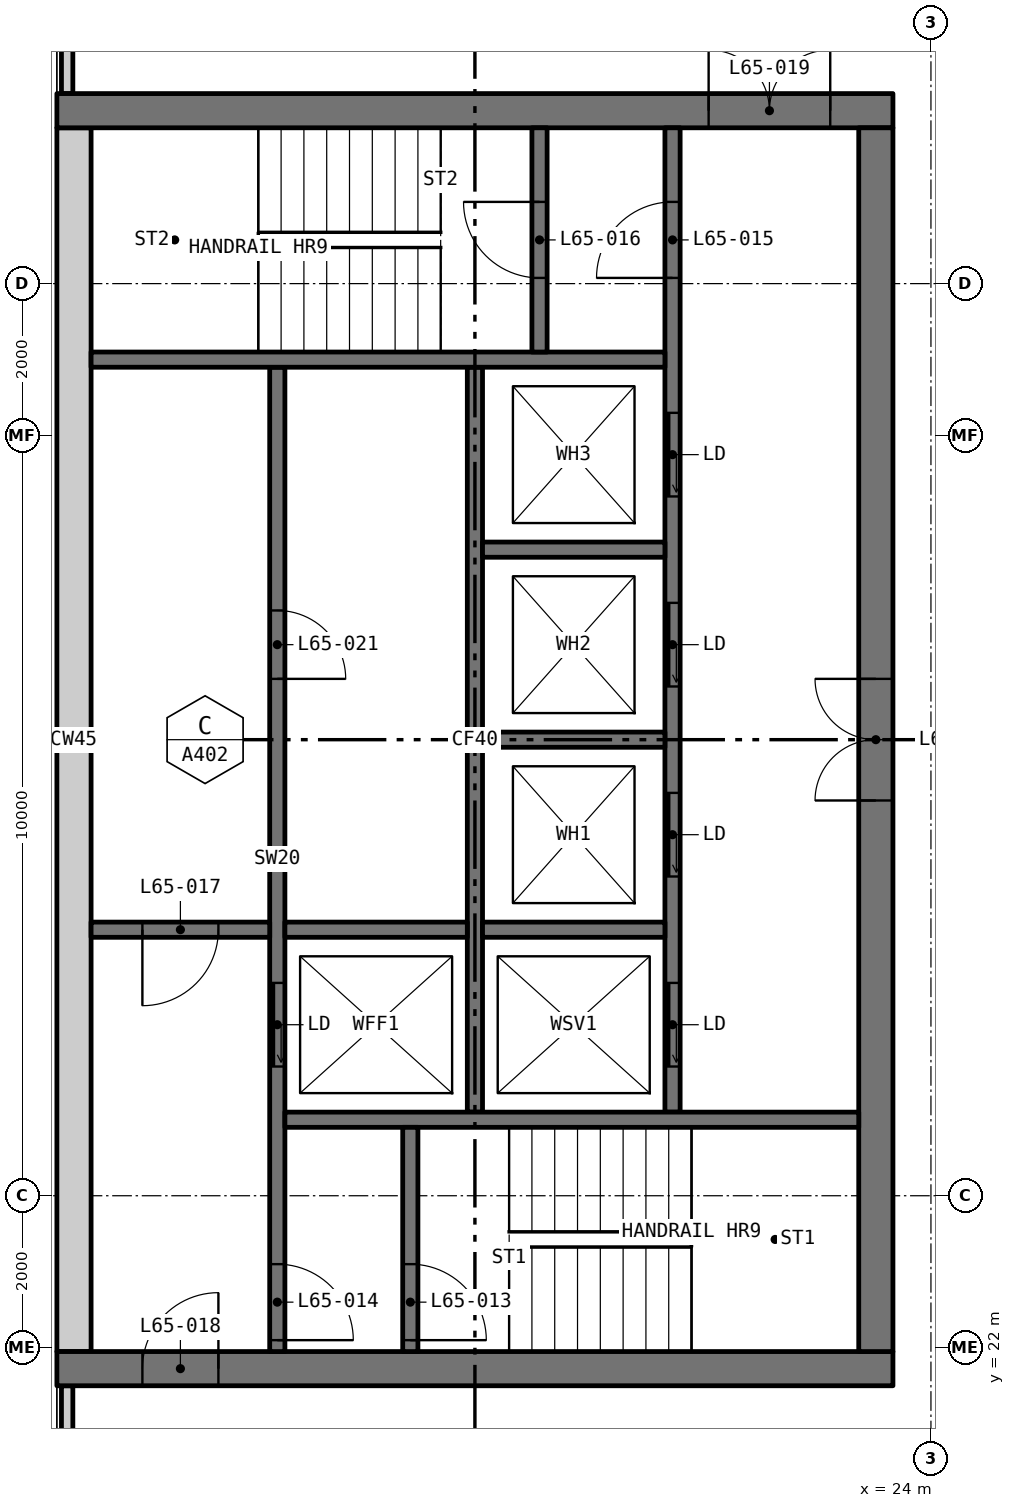
"""IFC4 building model, lengths in metres.
Left out: names, types, materials, properties, quantities, classifications, styles, units other than length and angle.
Written with IfcOpenShell. Run it as: python <this file> out.ifc"""

import sys

from ifc_helpers import new_model, si_unit, direction, frame, frame_2d, origin, place, context, subcontext, project, spatial, rectangle, extrude, element, fill, save


model = new_model("IFC4")
c1 = context("Model", 3, precision=1e-05, world=origin(), true_north=direction((0.0, 1.0)))
c2 = subcontext(c1, "Body", "Model", "MODEL_VIEW")
j1 = project(units=[si_unit("LENGTHUNIT", "METRE"), si_unit("PLANEANGLEUNIT", "RADIAN")], contexts=[c1])
p1 = place(None, origin())
s1 = spatial("IfcSite", under=j1, at=p1, CompositionType="ELEMENT")
p2 = place(p1, origin())
s2 = spatial("IfcBuilding", under=s1, at=p2, CompositionType="ELEMENT")
p3 = place(p2, frame((0.0, 0.0, 242.1)))
s3 = spatial("IfcBuildingStorey", under=s2, at=p3, CompositionType="ELEMENT", Elevation=242.1)
for number, where, z_axis, x_axis in (
    (1, (12.635, 18.71, 0.0), (0.0, 0.0, 1.0), (0.0, 1.0, 0.0)),
    (2, (12.635, 38.5, 0.0), (0.0, 0.0, 1.0), (0.0, 1.0, 0.0)),
):
    element("IfcWall", number, at=place(p3, frame(where, z_axis=z_axis, x_axis=x_axis)), inside=s3, PredefinedType="ELEMENTEDWALL", context=c2, shape_type="SweptSolid", body=[
        extrude(rectangle(XDim=2.79, YDim=0.15, at=frame_2d((1.395, 0.0))), origin(), (0.0, 0.0, 1.0), 3.05),
    ])
p4 = place(p3, frame((12.5, 21.725, 0.0), z_axis=(0.0, 0.0, 1.0), x_axis=(1.0, 0.0, 0.0)))
e3 = element("IfcWall", 3, at=p4, inside=s3, PredefinedType="SHEAR", context=c2, shape_type="SweptSolid", body=[
    extrude(rectangle(XDim=11.0, YDim=0.45, at=frame_2d((5.5, 0.0))), origin(), (0.0, 0.0, 1.0), 3.05),
])
p5 = place(p4, frame((1.125, 0.0, 0.0)))
e4 = element("IfcOpeningElement", 4, at=p5, cuts=e3, PredefinedType="OPENING", context=c2, shape_type="SweptSolid", body=[
    extrude(rectangle(XDim=1.0, YDim=2.1, at=frame_2d((0.5, 1.05))), frame((0.0, 0.235, 0.0), z_axis=(0.0, -1.0, 0.0), x_axis=(1.0, 0.0, 0.0)), (0.0, 0.0, 1.0), 0.47),
])
p6 = place(p3, frame((12.5, 38.275, 0.0), z_axis=(0.0, 0.0, 1.0), x_axis=(1.0, 0.0, 0.0)))
e5 = element("IfcWall", 5, at=p6, inside=s3, PredefinedType="SHEAR", context=c2, shape_type="SweptSolid", body=[
    extrude(rectangle(XDim=11.0, YDim=0.45, at=frame_2d((5.5, 0.0))), origin(), (0.0, 0.0, 1.0), 3.05),
])
p7 = place(p6, frame((8.575, 0.0, 0.0)))
e6 = element("IfcOpeningElement", 6, at=p7, cuts=e5, PredefinedType="OPENING", context=c2, shape_type="SweptSolid", body=[
    extrude(rectangle(XDim=1.6, YDim=2.1, at=frame_2d((0.8, 1.05))), frame((0.0, 0.235, 0.0), z_axis=(0.0, -1.0, 0.0), x_axis=(1.0, 0.0, 0.0)), (0.0, 0.0, 1.0), 0.47),
])
p8 = place(p3, frame((12.725, 21.95, 0.0), z_axis=(0.0, 0.0, 1.0), x_axis=(0.0, 1.0, 0.0)))
e7 = element("IfcWall", 7, at=p8, inside=s3, PredefinedType="SHEAR", context=c2, shape_type="SweptSolid", body=[
    extrude(rectangle(XDim=16.1, YDim=0.45, at=frame_2d((8.05, 0.0))), origin(), (0.0, 0.0, 1.0), 3.05),
])
p9 = place(p3, frame((23.275, 21.95, 0.0), z_axis=(0.0, 0.0, 1.0), x_axis=(0.0, 1.0, 0.0)))
e8 = element("IfcWall", 8, at=p9, inside=s3, PredefinedType="SHEAR", context=c2, shape_type="SweptSolid", body=[
    extrude(rectangle(XDim=16.1, YDim=0.45, at=frame_2d((8.05, 0.0))), origin(), (0.0, 0.0, 1.0), 3.05),
])
p10 = place(p9, frame((7.25, 0.0, 0.0)))
e9 = element("IfcOpeningElement", 9, at=p10, cuts=e8, PredefinedType="OPENING", context=c2, shape_type="SweptSolid", body=[
    extrude(rectangle(XDim=1.6, YDim=2.1, at=frame_2d((0.8, 1.05))), frame((0.0, 0.235, 0.0), z_axis=(0.0, -1.0, 0.0), x_axis=(1.0, 0.0, 0.0)), (0.0, 0.0, 1.0), 0.47),
])
p11 = place(p3, frame((15.4, 21.95, 0.0), z_axis=(0.0, 0.0, 1.0), x_axis=(0.0, 1.0, 0.0)))
e10 = element("IfcWall", 10, at=p11, inside=s3, PredefinedType="SOLIDWALL", context=c2, shape_type="SweptSolid", body=[
    extrude(rectangle(XDim=12.95, YDim=0.2, at=frame_2d((6.475, 0.0))), origin(), (0.0, 0.0, 1.0), 3.05),
])
p12 = place(p11, frame((3.75, 0.0, 0.0)))
e11 = element("IfcOpeningElement", 11, at=p12, cuts=e10, PredefinedType="OPENING", context=c2, shape_type="SweptSolid", body=[
    extrude(rectangle(XDim=1.1, YDim=2.1, at=frame_2d((0.55, 1.05))), frame((0.0, 0.11, 0.0), z_axis=(0.0, -1.0, 0.0), x_axis=(1.0, 0.0, 0.0)), (0.0, 0.0, 1.0), 0.22),
])
p13 = place(p11, frame((0.15, 0.0, 0.0)))
e12 = element("IfcOpeningElement", 12, at=p13, cuts=e10, PredefinedType="OPENING", context=c2, shape_type="SweptSolid", body=[
    extrude(rectangle(XDim=1.0, YDim=2.1, at=frame_2d((0.5, 1.05))), frame((0.0, 0.11, 0.0), z_axis=(0.0, -1.0, 0.0), x_axis=(1.0, 0.0, 0.0)), (0.0, 0.0, 1.0), 0.22),
])
p14 = place(p11, frame((8.85, 0.0, 0.0)))
e13 = element("IfcOpeningElement", 13, at=p14, cuts=e10, PredefinedType="OPENING", context=c2, shape_type="SweptSolid", body=[
    extrude(rectangle(XDim=0.9, YDim=2.1, at=frame_2d((0.45, 1.05))), frame((0.0, 0.11, 0.0), z_axis=(0.0, -1.0, 0.0), x_axis=(1.0, 0.0, 0.0)), (0.0, 0.0, 1.0), 0.22),
])
p15 = place(p3, frame((20.6, 25.1, 0.0), z_axis=(0.0, 0.0, 1.0), x_axis=(0.0, 1.0, 0.0)))
e14 = element("IfcWall", 14, at=p15, inside=s3, PredefinedType="SOLIDWALL", context=c2, shape_type="SweptSolid", body=[
    extrude(rectangle(XDim=12.95, YDim=0.2, at=frame_2d((6.475, 0.0))), origin(), (0.0, 0.0, 1.0), 3.05),
])
p16 = place(p15, frame((0.6, 0.0, 0.0)))
e15 = element("IfcOpeningElement", 15, at=p16, cuts=e14, PredefinedType="OPENING", context=c2, shape_type="SweptSolid", body=[
    extrude(rectangle(XDim=1.1, YDim=2.1, at=frame_2d((0.55, 1.05))), frame((0.0, 0.11, 0.0), z_axis=(0.0, -1.0, 0.0), x_axis=(1.0, 0.0, 0.0)), (0.0, 0.0, 1.0), 0.22),
])
p17 = place(p15, frame((3.1, 0.0, 0.0)))
e16 = element("IfcOpeningElement", 16, at=p17, cuts=e14, PredefinedType="OPENING", context=c2, shape_type="SweptSolid", body=[
    extrude(rectangle(XDim=1.1, YDim=2.1, at=frame_2d((0.55, 1.05))), frame((0.0, 0.11, 0.0), z_axis=(0.0, -1.0, 0.0), x_axis=(1.0, 0.0, 0.0)), (0.0, 0.0, 1.0), 0.22),
])
p18 = place(p15, frame((5.6, 0.0, 0.0)))
e17 = element("IfcOpeningElement", 17, at=p18, cuts=e14, PredefinedType="OPENING", context=c2, shape_type="SweptSolid", body=[
    extrude(rectangle(XDim=1.1, YDim=2.1, at=frame_2d((0.55, 1.05))), frame((0.0, 0.11, 0.0), z_axis=(0.0, -1.0, 0.0), x_axis=(1.0, 0.0, 0.0)), (0.0, 0.0, 1.0), 0.22),
])
p19 = place(p15, frame((8.1, 0.0, 0.0)))
e18 = element("IfcOpeningElement", 18, at=p19, cuts=e14, PredefinedType="OPENING", context=c2, shape_type="SweptSolid", body=[
    extrude(rectangle(XDim=1.1, YDim=2.1, at=frame_2d((0.55, 1.05))), frame((0.0, 0.11, 0.0), z_axis=(0.0, -1.0, 0.0), x_axis=(1.0, 0.0, 0.0)), (0.0, 0.0, 1.0), 0.22),
])
p20 = place(p15, frame((10.975, 0.0, 0.0)))
e19 = element("IfcOpeningElement", 19, at=p20, cuts=e14, PredefinedType="OPENING", context=c2, shape_type="SweptSolid", body=[
    extrude(rectangle(XDim=1.0, YDim=2.1, at=frame_2d((0.5, 1.05))), frame((0.0, 0.11, 0.0), z_axis=(0.0, -1.0, 0.0), x_axis=(1.0, 0.0, 0.0)), (0.0, 0.0, 1.0), 0.22),
])
p21 = place(p3, frame((18.0, 25.1, 0.0), z_axis=(0.0, 0.0, 1.0), x_axis=(0.0, 1.0, 0.0)))
e20 = element("IfcWall", 20, at=p21, inside=s3, PredefinedType="SOLIDWALL", context=c2, shape_type="SweptSolid", body=[
    extrude(rectangle(XDim=9.8, YDim=0.2, at=frame_2d((4.9, 0.0))), origin(), (0.0, 0.0, 1.0), 3.05),
])
for number, where, z_axis, x_axis in (
    (21, (15.5, 25.0, 0.0), (0.0, 0.0, 1.0), (1.0, 0.0, 0.0)),
    (22, (12.95, 35.0, 0.0), (0.0, 0.0, 1.0), (1.0, 0.0, 0.0)),
):
    element("IfcWall", number, at=place(p3, frame(where, z_axis=z_axis, x_axis=x_axis)), inside=s3, PredefinedType="SOLIDWALL", context=c2, shape_type="SweptSolid", body=[
        extrude(rectangle(XDim=7.55, YDim=0.2, at=frame_2d((3.775, 0.0))), origin(), (0.0, 0.0, 1.0), 3.05),
    ])
p22 = place(p3, frame((12.95, 27.5, 0.0), z_axis=(0.0, 0.0, 1.0), x_axis=(1.0, 0.0, 0.0)))
e23 = element("IfcWall", 23, at=p22, inside=s3, PredefinedType="SOLIDWALL", context=c2, shape_type="SweptSolid", body=[
    extrude(rectangle(XDim=2.35, YDim=0.2, at=frame_2d((1.175, 0.0))), origin(), (0.0, 0.0, 1.0), 3.05),
])
p23 = place(p22, frame((0.675, 0.0, 0.0)))
e24 = element("IfcOpeningElement", 24, at=p23, cuts=e23, PredefinedType="OPENING", context=c2, shape_type="SweptSolid", body=[
    extrude(rectangle(XDim=1.0, YDim=2.1, at=frame_2d((0.5, 1.05))), frame((0.0, 0.11, 0.0), z_axis=(0.0, -1.0, 0.0), x_axis=(1.0, 0.0, 0.0)), (0.0, 0.0, 1.0), 0.22),
])
p24 = place(p3, frame((17.15, 21.95, 0.0), z_axis=(0.0, 0.0, 1.0), x_axis=(0.0, 1.0, 0.0)))
e25 = element("IfcWall", 25, at=p24, inside=s3, PredefinedType="SOLIDWALL", context=c2, shape_type="SweptSolid", body=[
    extrude(rectangle(XDim=2.95, YDim=0.2, at=frame_2d((1.475, 0.0))), origin(), (0.0, 0.0, 1.0), 3.05),
])
p25 = place(p24, frame((0.15, 0.0, 0.0)))
e26 = element("IfcOpeningElement", 26, at=p25, cuts=e25, PredefinedType="OPENING", context=c2, shape_type="SweptSolid", body=[
    extrude(rectangle(XDim=1.0, YDim=2.1, at=frame_2d((0.5, 1.05))), frame((0.0, 0.11, 0.0), z_axis=(0.0, -1.0, 0.0), x_axis=(1.0, 0.0, 0.0)), (0.0, 0.0, 1.0), 0.22),
])
p26 = place(p3, frame((18.85, 35.1, 0.0), z_axis=(0.0, 0.0, 1.0), x_axis=(0.0, 1.0, 0.0)))
e27 = element("IfcWall", 27, at=p26, inside=s3, PredefinedType="SOLIDWALL", context=c2, shape_type="SweptSolid", body=[
    extrude(rectangle(XDim=2.95, YDim=0.2, at=frame_2d((1.475, 0.0))), origin(), (0.0, 0.0, 1.0), 3.05),
])
p27 = place(p26, frame((0.975, 0.0, 0.0)))
e28 = element("IfcOpeningElement", 28, at=p27, cuts=e27, PredefinedType="OPENING", context=c2, shape_type="SweptSolid", body=[
    extrude(rectangle(XDim=1.0, YDim=2.1, at=frame_2d((0.5, 1.05))), frame((0.0, 0.11, 0.0), z_axis=(0.0, -1.0, 0.0), x_axis=(1.0, 0.0, 0.0)), (0.0, 0.0, 1.0), 0.22),
])
for number, where, z_axis, x_axis in (
    (29, (15.5, 27.5, 0.0), (0.0, 0.0, 1.0), (1.0, 0.0, 0.0)),
    (30, (18.1, 27.5, 0.0), (0.0, 0.0, 1.0), (1.0, 0.0, 0.0)),
    (31, (18.1, 30.0, 0.0), (0.0, 0.0, 1.0), (1.0, 0.0, 0.0)),
    (32, (18.1, 32.5, 0.0), (0.0, 0.0, 1.0), (1.0, 0.0, 0.0)),
):
    element("IfcWall", number, at=place(p3, frame(where, z_axis=z_axis, x_axis=x_axis)), inside=s3, PredefinedType="SOLIDWALL", context=c2, shape_type="SweptSolid", body=[
        extrude(rectangle(XDim=2.4, YDim=0.2, at=frame_2d((1.2, 0.0))), origin(), (0.0, 0.0, 1.0), 3.05),
    ])
p28 = place(p16, origin())
e33 = element("IfcDoor", 33, at=p28, inside=s3, OperationType="SLIDING_TO_LEFT", PredefinedType="DOOR", context=c2, shape_type="SweptSolid", body=[
    extrude(rectangle(XDim=1.1, YDim=2.1, at=frame_2d((0.55, 1.05))), frame((0.0, 0.025, 0.0), z_axis=(0.0, -1.0, 0.0), x_axis=(1.0, 0.0, 0.0)), (0.0, 0.0, 1.0), 0.05),
])
fill(e15, e33)
p29 = place(p17, origin())
e34 = element("IfcDoor", 34, at=p29, inside=s3, OperationType="SLIDING_TO_LEFT", PredefinedType="DOOR", context=c2, shape_type="SweptSolid", body=[
    extrude(rectangle(XDim=1.1, YDim=2.1, at=frame_2d((0.55, 1.05))), frame((0.0, 0.025, 0.0), z_axis=(0.0, -1.0, 0.0), x_axis=(1.0, 0.0, 0.0)), (0.0, 0.0, 1.0), 0.05),
])
fill(e16, e34)
p30 = place(p18, origin())
e35 = element("IfcDoor", 35, at=p30, inside=s3, OperationType="SLIDING_TO_LEFT", PredefinedType="DOOR", context=c2, shape_type="SweptSolid", body=[
    extrude(rectangle(XDim=1.1, YDim=2.1, at=frame_2d((0.55, 1.05))), frame((0.0, 0.025, 0.0), z_axis=(0.0, -1.0, 0.0), x_axis=(1.0, 0.0, 0.0)), (0.0, 0.0, 1.0), 0.05),
])
fill(e17, e35)
p31 = place(p19, origin())
e36 = element("IfcDoor", 36, at=p31, inside=s3, OperationType="SLIDING_TO_LEFT", PredefinedType="DOOR", context=c2, shape_type="SweptSolid", body=[
    extrude(rectangle(XDim=1.1, YDim=2.1, at=frame_2d((0.55, 1.05))), frame((0.0, 0.025, 0.0), z_axis=(0.0, -1.0, 0.0), x_axis=(1.0, 0.0, 0.0)), (0.0, 0.0, 1.0), 0.05),
])
fill(e18, e36)
p32 = place(p12, origin())
e37 = element("IfcDoor", 37, at=p32, inside=s3, OperationType="SLIDING_TO_LEFT", PredefinedType="DOOR", context=c2, shape_type="SweptSolid", body=[
    extrude(rectangle(XDim=1.1, YDim=2.1, at=frame_2d((0.55, 1.05))), frame((0.0, 0.025, 0.0), z_axis=(0.0, -1.0, 0.0), x_axis=(1.0, 0.0, 0.0)), (0.0, 0.0, 1.0), 0.05),
])
fill(e11, e37)
p33 = place(p25, frame((1.0, 0.0, 0.0), x_axis=(-1.0, 0.0, 0.0)))
e38 = element("IfcDoor", 38, at=p33, inside=s3, OperationType="SINGLE_SWING_LEFT", PredefinedType="DOOR", context=c2, shape_type="SweptSolid", body=[
    extrude(rectangle(XDim=1.0, YDim=2.1, at=frame_2d((0.5, 1.05))), frame((0.0, 0.025, 0.0), z_axis=(0.0, -1.0, 0.0), x_axis=(1.0, 0.0, 0.0)), (0.0, 0.0, 1.0), 0.05),
])
fill(e26, e38)
p34 = place(p13, frame((1.0, 0.0, 0.0), x_axis=(-1.0, 0.0, 0.0)))
e39 = element("IfcDoor", 39, at=p34, inside=s3, OperationType="SINGLE_SWING_LEFT", PredefinedType="DOOR", context=c2, shape_type="SweptSolid", body=[
    extrude(rectangle(XDim=1.0, YDim=2.1, at=frame_2d((0.5, 1.05))), frame((0.0, 0.025, 0.0), z_axis=(0.0, -1.0, 0.0), x_axis=(1.0, 0.0, 0.0)), (0.0, 0.0, 1.0), 0.05),
])
fill(e12, e39)
p35 = place(p20, origin())
e40 = element("IfcDoor", 40, at=p35, inside=s3, OperationType="SINGLE_SWING_RIGHT", PredefinedType="DOOR", context=c2, shape_type="SweptSolid", body=[
    extrude(rectangle(XDim=1.0, YDim=2.1, at=frame_2d((0.5, 1.05))), frame((0.0, 0.025, 0.0), z_axis=(0.0, -1.0, 0.0), x_axis=(1.0, 0.0, 0.0)), (0.0, 0.0, 1.0), 0.05),
])
fill(e19, e40)
p36 = place(p27, origin())
e41 = element("IfcDoor", 41, at=p36, inside=s3, OperationType="SINGLE_SWING_LEFT", PredefinedType="DOOR", context=c2, shape_type="SweptSolid", body=[
    extrude(rectangle(XDim=1.0, YDim=2.1, at=frame_2d((0.5, 1.05))), frame((0.0, 0.025, 0.0), z_axis=(0.0, -1.0, 0.0), x_axis=(1.0, 0.0, 0.0)), (0.0, 0.0, 1.0), 0.05),
])
fill(e28, e41)
p37 = place(p23, frame((1.0, 0.0, 0.0), x_axis=(-1.0, 0.0, 0.0)))
e42 = element("IfcDoor", 42, at=p37, inside=s3, OperationType="SINGLE_SWING_LEFT", PredefinedType="DOOR", context=c2, shape_type="SweptSolid", body=[
    extrude(rectangle(XDim=1.0, YDim=2.1, at=frame_2d((0.5, 1.05))), frame((0.0, 0.025, 0.0), z_axis=(0.0, -1.0, 0.0), x_axis=(1.0, 0.0, 0.0)), (0.0, 0.0, 1.0), 0.05),
])
fill(e24, e42)
p38 = place(p5, origin())
e43 = element("IfcDoor", 43, at=p38, inside=s3, OperationType="SINGLE_SWING_LEFT", PredefinedType="DOOR", context=c2, shape_type="SweptSolid", body=[
    extrude(rectangle(XDim=1.0, YDim=2.1, at=frame_2d((0.5, 1.05))), frame((0.0, 0.025, 0.0), z_axis=(0.0, -1.0, 0.0), x_axis=(1.0, 0.0, 0.0)), (0.0, 0.0, 1.0), 0.05),
])
fill(e4, e43)
p39 = place(p7, origin())
e44 = element("IfcDoor", 44, at=p39, inside=s3, OperationType="DOUBLE_DOOR_SINGLE_SWING", PredefinedType="DOOR", context=c2, shape_type="SweptSolid", body=[
    extrude(rectangle(XDim=1.6, YDim=2.1, at=frame_2d((0.8, 1.05))), frame((0.0, 0.025, 0.0), z_axis=(0.0, -1.0, 0.0), x_axis=(1.0, 0.0, 0.0)), (0.0, 0.0, 1.0), 0.05),
])
fill(e6, e44)
p40 = place(p10, origin())
e45 = element("IfcDoor", 45, at=p40, inside=s3, OperationType="DOUBLE_DOOR_SINGLE_SWING", PredefinedType="DOOR", context=c2, shape_type="SweptSolid", body=[
    extrude(rectangle(XDim=1.6, YDim=2.1, at=frame_2d((0.8, 1.05))), frame((0.0, 0.025, 0.0), z_axis=(0.0, -1.0, 0.0), x_axis=(1.0, 0.0, 0.0)), (0.0, 0.0, 1.0), 0.05),
])
fill(e9, e45)
p41 = place(p14, frame((0.9, 0.0, 0.0), x_axis=(-1.0, 0.0, 0.0)))
e46 = element("IfcDoor", 46, at=p41, inside=s3, OperationType="SINGLE_SWING_LEFT", PredefinedType="DOOR", context=c2, shape_type="SweptSolid", body=[
    extrude(rectangle(XDim=0.9, YDim=2.1, at=frame_2d((0.45, 1.05))), frame((0.0, 0.025, 0.0), z_axis=(0.0, -1.0, 0.0), x_axis=(1.0, 0.0, 0.0)), (0.0, 0.0, 1.0), 0.05),
])
fill(e13, e46)
save(model, sys.argv[1])
